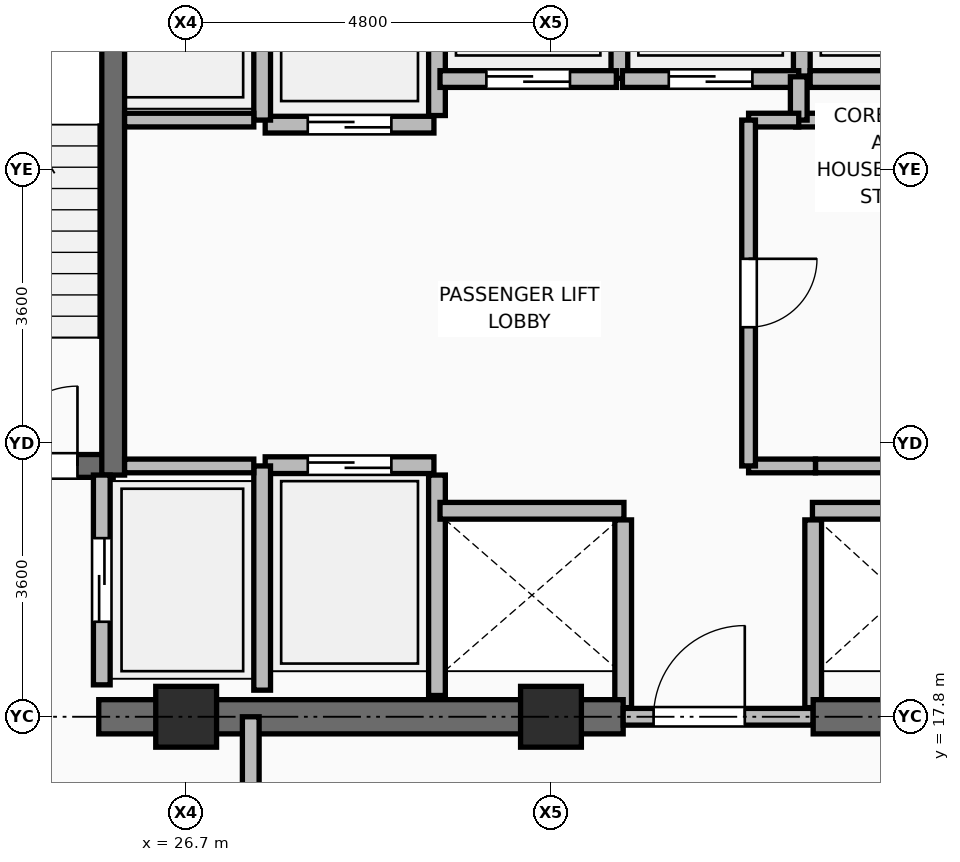
"""IFC4 building model, lengths in metres.
Left out: names, types, materials, properties, quantities, classifications, styles, units other than length and angle.
Written with IfcOpenShell. Run it as: python <this file> out.ifc"""

import sys

from ifc_helpers import new_model, si_unit, direction, frame, frame_2d, origin, origin_2d, place, context, subcontext, project, spatial, rectangle, extrude, element, fill, save


model = new_model("IFC4")
c1 = context("Model", 3, precision=1e-05, world=origin(), true_north=direction((0.0, 1.0)))
c2 = subcontext(c1, "Body", "Model", "MODEL_VIEW")
j1 = project(units=[si_unit("LENGTHUNIT", "METRE"), si_unit("PLANEANGLEUNIT", "RADIAN")], contexts=[c1])
p1 = place(None, origin())
s1 = spatial("IfcSite", under=j1, at=p1, CompositionType="ELEMENT")
p2 = place(p1, origin())
s2 = spatial("IfcBuilding", under=s1, at=p2, CompositionType="ELEMENT")
p3 = place(p2, frame((0.0, 0.0, 249.9)))
s3 = spatial("IfcBuildingStorey", under=s2, at=p3, CompositionType="ELEMENT", Elevation=249.9)
for number, where, z_axis, x_axis in (
    (1, (26.7, 17.8, 0.0), (0.0, 0.0, 1.0), (1.0, 0.0, 0.0)),
    (2, (31.5, 17.8, 0.0), (0.0, 0.0, 1.0), (1.0, 0.0, 0.0)),
):
    element("IfcColumn", number, at=place(p3, frame(where, z_axis=z_axis, x_axis=x_axis)), inside=s3, PredefinedType="COLUMN", context=c2, shape_type="SweptSolid", body=[
        extrude(rectangle(XDim=0.8, YDim=0.8, at=origin_2d()), origin(), (0.0, 0.0, 1.0), 3.75),
    ])
p4 = place(p3, frame((30.0, 18.08, 0.0), z_axis=(0.0, 0.0, 1.0), x_axis=(0.0, 1.0, 0.0)))
e3 = element("IfcWall", 3, at=p4, inside=s3, PredefinedType="PARTITIONING", context=c2, shape_type="SweptSolid", body=[
    extrude(rectangle(XDim=2.9, YDim=0.22, at=frame_2d((1.45, 0.0))), origin(), (0.0, 0.0, 1.0), 3.475),
])
for number, where, z_axis, x_axis in (
    (4, (32.45, 17.92, 0.0), (0.0, 0.0, 1.0), (0.0, 1.0, 0.0)),
    (5, (34.95, 17.92, 0.0), (0.0, 0.0, 1.0), (0.0, 1.0, 0.0)),
):
    element("IfcWall", number, at=place(p3, frame(where, z_axis=z_axis, x_axis=x_axis)), inside=s3, PredefinedType="PARTITIONING", context=c2, shape_type="SweptSolid", body=[
        extrude(rectangle(XDim=2.47, YDim=0.22, at=frame_2d((1.235, 0.0))), origin(), (0.0, 0.0, 1.0), 3.475),
    ])
p5 = place(p3, frame((30.0, 25.71, 0.0), z_axis=(0.0, 0.0, 1.0), x_axis=(0.0, 1.0, 0.0)))
e6 = element("IfcWall", 6, at=p5, inside=s3, PredefinedType="PARTITIONING", context=c2, shape_type="SweptSolid", body=[
    extrude(rectangle(XDim=2.73, YDim=0.22, at=frame_2d((1.365, 0.0))), origin(), (0.0, 0.0, 1.0), 3.475),
])
p6 = place(p3, frame((32.4, 26.2, 0.0), z_axis=(0.0, 0.0, 1.0), x_axis=(0.0, 1.0, 0.0)))
e7 = element("IfcWall", 7, at=p6, inside=s3, PredefinedType="PARTITIONING", context=c2, shape_type="SweptSolid", body=[
    extrude(rectangle(XDim=2.24, YDim=0.22, at=frame_2d((1.12, 0.0))), origin(), (0.0, 0.0, 1.0), 3.475),
])
p7 = place(p3, frame((34.8, 26.23, 0.0), z_axis=(0.0, 0.0, 1.0), x_axis=(0.0, 1.0, 0.0)))
e8 = element("IfcWall", 8, at=p7, inside=s3, PredefinedType="PARTITIONING", context=c2, shape_type="SweptSolid", body=[
    extrude(rectangle(XDim=2.21, YDim=0.22, at=frame_2d((1.105, 0.0))), origin(), (0.0, 0.0, 1.0), 3.475),
])
p8 = place(p3, frame((34.91, 26.19, 0.0), z_axis=(0.0, 0.0, 1.0), x_axis=(1.0, 0.0, 0.0)))
e9 = element("IfcWall", 9, at=p8, inside=s3, PredefinedType="PARTITIONING", context=c2, shape_type="SweptSolid", body=[
    extrude(rectangle(XDim=2.14, YDim=0.22, at=frame_2d((1.07, 0.0))), origin(), (0.0, 0.0, 1.0), 3.475),
])
p9 = place(p3, frame((25.55, 17.8, 0.0), z_axis=(0.0, 0.0, 1.0), x_axis=(1.0, 0.0, 0.0)))
e10 = element("IfcWall", 10, at=p9, inside=s3, PredefinedType="SHEAR", context=c2, shape_type="SweptSolid", body=[
    extrude(rectangle(XDim=6.9, YDim=0.45, at=frame_2d((3.45, 0.0))), origin(), (0.0, 0.0, 1.0), 3.5),
])
p10 = place(p3, frame((32.45, 17.8, 0.0), z_axis=(0.0, 0.0, 1.0), x_axis=(1.0, 0.0, 0.0)))
e11 = element("IfcWall", 11, at=p10, inside=s3, PredefinedType="PARTITIONING", context=c2, shape_type="SweptSolid", body=[
    extrude(rectangle(XDim=2.5, YDim=0.22, at=frame_2d((1.25, 0.0))), origin(), (0.0, 0.0, 1.0), 3.012),
])
p11 = place(p10, frame((0.4, 0.0, 0.0)))
e12 = element("IfcOpeningElement", 12, at=p11, cuts=e11, PredefinedType="OPENING", context=c2, shape_type="SweptSolid", body=[
    extrude(rectangle(XDim=1.2, YDim=2.1, at=frame_2d((0.6, 1.05))), frame((0.0, 0.12, 0.0), z_axis=(0.0, -1.0, 0.0), x_axis=(1.0, 0.0, 0.0)), (0.0, 0.0, 1.0), 0.24),
])
p12 = place(p3, frame((34.95, 17.8, 0.0), z_axis=(0.0, 0.0, 1.0), x_axis=(1.0, 0.0, 0.0)))
e13 = element("IfcWall", 13, at=p12, inside=s3, PredefinedType="SHEAR", context=c2, shape_type="SweptSolid", body=[
    extrude(rectangle(XDim=6.375, YDim=0.45, at=frame_2d((3.188, 0.0))), origin(), (0.0, 0.0, 1.0), 3.5),
])
p13 = place(p3, frame((22.125, 21.1, 0.0), z_axis=(0.0, 0.0, 1.0), x_axis=(1.0, 0.0, 0.0)))
e14 = element("IfcWall", 14, at=p13, inside=s3, PredefinedType="SHEAR", context=c2, shape_type="SweptSolid", body=[
    extrude(rectangle(XDim=3.615, YDim=0.3, at=frame_2d((1.808, 0.0))), origin(), (0.0, 0.0, 1.0), 3.5),
])
p14 = place(p13, frame((2.095, 0.0, 0.0)))
e15 = element("IfcOpeningElement", 15, at=p14, cuts=e14, PredefinedType="OPENING", context=c2, shape_type="SweptSolid", body=[
    extrude(rectangle(XDim=1.05, YDim=2.1, at=frame_2d((0.525, 1.05))), frame((0.0, 0.16, 0.0), z_axis=(0.0, -1.0, 0.0), x_axis=(1.0, 0.0, 0.0)), (0.0, 0.0, 1.0), 0.32),
])
p15 = place(p3, frame((25.74, 20.98, 0.0), z_axis=(0.0, 0.0, 1.0), x_axis=(0.0, 1.0, 0.0)))
e16 = element("IfcWall", 16, at=p15, inside=s3, PredefinedType="SHEAR", context=c2, shape_type="SweptSolid", body=[
    extrude(rectangle(XDim=7.99, YDim=0.3, at=frame_2d((3.995, 0.0))), origin(), (0.0, 0.0, 1.0), 3.5),
])
p16 = place(p3, frame((25.59, 18.22, 0.0), z_axis=(0.0, 0.0, 1.0), x_axis=(0.0, 1.0, 0.0)))
e17 = element("IfcWall", 17, at=p16, inside=s3, PredefinedType="PARTITIONING", context=c2, shape_type="SweptSolid", body=[
    extrude(rectangle(XDim=2.76, YDim=0.22, at=frame_2d((1.38, 0.0))), origin(), (0.0, 0.0, 1.0), 3.48),
])
p17 = place(p16, frame((0.83, 0.0, 0.0)))
e18 = element("IfcOpeningElement", 18, at=p17, cuts=e17, PredefinedType="OPENING", context=c2, shape_type="SweptSolid", body=[
    extrude(rectangle(XDim=1.1, YDim=2.2, at=frame_2d((0.55, 1.1))), frame((0.0, 0.12, 0.0), z_axis=(0.0, -1.0, 0.0), x_axis=(1.0, 0.0, 0.0)), (0.0, 0.0, 1.0), 0.24),
])
p18 = place(p3, frame((27.74, 21.11, 0.0), z_axis=(0.0, 0.0, 1.0), x_axis=(1.0, 0.0, 0.0)))
e19 = element("IfcWall", 19, at=p18, inside=s3, PredefinedType="PARTITIONING", context=c2, shape_type="SweptSolid", body=[
    extrude(rectangle(XDim=2.22, YDim=0.22, at=frame_2d((1.11, 0.0))), origin(), (0.0, 0.0, 1.0), 3.48),
])
p19 = place(p18, frame((0.56, 0.0, 0.0)))
e20 = element("IfcOpeningElement", 20, at=p19, cuts=e19, PredefinedType="OPENING", context=c2, shape_type="SweptSolid", body=[
    extrude(rectangle(XDim=1.1, YDim=2.2, at=frame_2d((0.55, 1.1))), frame((0.0, 0.12, 0.0), z_axis=(0.0, -1.0, 0.0), x_axis=(1.0, 0.0, 0.0)), (0.0, 0.0, 1.0), 0.24),
])
p20 = place(p3, frame((27.74, 25.59, 0.0), z_axis=(0.0, 0.0, 1.0), x_axis=(1.0, 0.0, 0.0)))
e21 = element("IfcWall", 21, at=p20, inside=s3, PredefinedType="PARTITIONING", context=c2, shape_type="SweptSolid", body=[
    extrude(rectangle(XDim=2.22, YDim=0.22, at=frame_2d((1.11, 0.0))), origin(), (0.0, 0.0, 1.0), 3.48),
])
p21 = place(p20, frame((0.56, 0.0, 0.0)))
e22 = element("IfcOpeningElement", 22, at=p21, cuts=e21, PredefinedType="OPENING", context=c2, shape_type="SweptSolid", body=[
    extrude(rectangle(XDim=1.1, YDim=2.2, at=frame_2d((0.55, 1.1))), frame((0.0, 0.12, 0.0), z_axis=(0.0, -1.0, 0.0), x_axis=(1.0, 0.0, 0.0)), (0.0, 0.0, 1.0), 0.24),
])
p22 = place(p3, frame((30.04, 20.51, 0.0), z_axis=(0.0, 0.0, 1.0), x_axis=(1.0, 0.0, 0.0)))
e23 = element("IfcWall", 23, at=p22, inside=s3, PredefinedType="PARTITIONING", context=c2, shape_type="SweptSolid", body=[
    extrude(rectangle(XDim=2.42, YDim=0.22, at=frame_2d((1.21, 0.0))), origin(), (0.0, 0.0, 1.0), 3.48),
])
p23 = place(p3, frame((34.94, 20.51, 0.0), z_axis=(0.0, 0.0, 1.0), x_axis=(1.0, 0.0, 0.0)))
e24 = element("IfcWall", 24, at=p23, inside=s3, PredefinedType="PARTITIONING", context=c2, shape_type="SweptSolid", body=[
    extrude(rectangle(XDim=2.24, YDim=0.22, at=frame_2d((1.12, 0.0))), origin(), (0.0, 0.0, 1.0), 3.48),
])
p24 = place(p3, frame((30.04, 26.19, 0.0), z_axis=(0.0, 0.0, 1.0), x_axis=(1.0, 0.0, 0.0)))
e25 = element("IfcWall", 25, at=p24, inside=s3, PredefinedType="PARTITIONING", context=c2, shape_type="SweptSolid", body=[
    extrude(rectangle(XDim=2.32, YDim=0.22, at=frame_2d((1.16, 0.0))), origin(), (0.0, 0.0, 1.0), 3.48),
])
p25 = place(p24, frame((0.61, 0.0, 0.0)))
e26 = element("IfcOpeningElement", 26, at=p25, cuts=e25, PredefinedType="OPENING", context=c2, shape_type="SweptSolid", body=[
    extrude(rectangle(XDim=1.1, YDim=2.2, at=frame_2d((0.55, 1.1))), frame((0.0, 0.12, 0.0), z_axis=(0.0, -1.0, 0.0), x_axis=(1.0, 0.0, 0.0)), (0.0, 0.0, 1.0), 0.24),
])
p26 = place(p3, frame((32.44, 26.19, 0.0), z_axis=(0.0, 0.0, 1.0), x_axis=(1.0, 0.0, 0.0)))
e27 = element("IfcWall", 27, at=p26, inside=s3, PredefinedType="PARTITIONING", context=c2, shape_type="SweptSolid", body=[
    extrude(rectangle(XDim=2.32, YDim=0.22, at=frame_2d((1.16, 0.0))), origin(), (0.0, 0.0, 1.0), 3.48),
])
p27 = place(p26, frame((0.61, 0.0, 0.0)))
e28 = element("IfcOpeningElement", 28, at=p27, cuts=e27, PredefinedType="OPENING", context=c2, shape_type="SweptSolid", body=[
    extrude(rectangle(XDim=1.1, YDim=2.2, at=frame_2d((0.55, 1.1))), frame((0.0, 0.12, 0.0), z_axis=(0.0, -1.0, 0.0), x_axis=(1.0, 0.0, 0.0)), (0.0, 0.0, 1.0), 0.24),
])
p28 = place(p3, frame((27.7, 18.15, 0.0), z_axis=(0.0, 0.0, 1.0), x_axis=(0.0, 1.0, 0.0)))
e29 = element("IfcWall", 29, at=p28, inside=s3, PredefinedType="PARTITIONING", context=c2, shape_type="SweptSolid", body=[
    extrude(rectangle(XDim=2.95, YDim=0.22, at=frame_2d((1.475, 0.0))), origin(), (0.0, 0.0, 1.0), 3.48),
])
p29 = place(p3, frame((27.7, 25.65, 0.0), z_axis=(0.0, 0.0, 1.0), x_axis=(0.0, 1.0, 0.0)))
e30 = element("IfcWall", 30, at=p29, inside=s3, PredefinedType="PARTITIONING", context=c2, shape_type="SweptSolid", body=[
    extrude(rectangle(XDim=3.0, YDim=0.22, at=frame_2d((1.5, 0.0))), origin(), (0.0, 0.0, 1.0), 3.48),
])
for number, where, z_axis, x_axis in (
    (31, (25.89, 21.1, 0.0), (0.0, 0.0, 1.0), (1.0, 0.0, 0.0)),
    (32, (25.89, 25.65, 0.0), (0.0, 0.0, 1.0), (1.0, 0.0, 0.0)),
):
    element("IfcWall", number, at=place(p3, frame(where, z_axis=z_axis, x_axis=x_axis)), inside=s3, PredefinedType="PARTITIONING", context=c2, shape_type="SweptSolid", body=[
        extrude(rectangle(XDim=1.7, YDim=0.18, at=frame_2d((0.85, 0.0))), origin(), (0.0, 0.0, 1.0), 3.48),
    ])
p30 = place(p3, frame((34.98, 21.1, 0.0), z_axis=(0.0, 0.0, 1.0), x_axis=(1.0, 0.0, 0.0)))
e33 = element("IfcWall", 33, at=p30, inside=s3, PredefinedType="PARTITIONING", context=c2, shape_type="SweptSolid", body=[
    extrude(rectangle(XDim=2.08, YDim=0.18, at=frame_2d((1.04, 0.0))), origin(), (0.0, 0.0, 1.0), 3.48),
])
p31 = place(p3, frame((34.72, 25.65, 0.0), z_axis=(0.0, 0.0, 1.0), x_axis=(1.0, 0.0, 0.0)))
e34 = element("IfcWall", 34, at=p31, inside=s3, PredefinedType="PARTITIONING", context=c2, shape_type="SweptSolid", body=[
    extrude(rectangle(XDim=2.34, YDim=0.18, at=frame_2d((1.17, 0.0))), origin(), (0.0, 0.0, 1.0), 3.48),
])
p32 = place(p3, frame((34.76, 25.65, 0.0), z_axis=(0.0, 0.0, 1.0), x_axis=(0.0, 1.0, 0.0)))
e35 = element("IfcWall", 35, at=p32, inside=s3, PredefinedType="PARTITIONING", context=c2, shape_type="SweptSolid", body=[
    extrude(rectangle(XDim=0.57, YDim=0.22, at=frame_2d((0.285, 0.0))), origin(), (0.0, 0.0, 1.0), 3.48),
])
p33 = place(p3, frame((34.1, 21.1, 0.0), z_axis=(0.0, 0.0, 1.0), x_axis=(1.0, 0.0, 0.0)))
e36 = element("IfcWall", 36, at=p33, inside=s3, PredefinedType="PARTITIONING", context=c2, shape_type="SweptSolid", body=[
    extrude(rectangle(XDim=0.88, YDim=0.18, at=frame_2d((0.44, 0.0))), origin(), (0.0, 0.0, 1.0), 3.48),
])
p34 = place(p3, frame((34.1, 25.65, 0.0), z_axis=(0.0, 0.0, 1.0), x_axis=(1.0, 0.0, 0.0)))
e37 = element("IfcWall", 37, at=p34, inside=s3, PredefinedType="PARTITIONING", context=c2, shape_type="SweptSolid", body=[
    extrude(rectangle(XDim=0.66, YDim=0.18, at=frame_2d((0.33, 0.0))), origin(), (0.0, 0.0, 1.0), 3.48),
])
p35 = place(p3, frame((34.1, 21.1, 0.0), z_axis=(0.0, 0.0, 1.0), x_axis=(0.0, 1.0, 0.0)))
e38 = element("IfcWall", 38, at=p35, inside=s3, PredefinedType="PARTITIONING", context=c2, shape_type="SweptSolid", body=[
    extrude(rectangle(XDim=4.55, YDim=0.18, at=frame_2d((2.275, 0.0))), origin(), (0.0, 0.0, 1.0), 3.48),
])
p36 = place(p35, frame((1.825, 0.0, 0.0)))
e39 = element("IfcOpeningElement", 39, at=p36, cuts=e38, PredefinedType="OPENING", context=c2, shape_type="SweptSolid", body=[
    extrude(rectangle(XDim=0.9, YDim=2.1, at=frame_2d((0.45, 1.05))), frame((0.0, 0.1, 0.0), z_axis=(0.0, -1.0, 0.0), x_axis=(1.0, 0.0, 0.0)), (0.0, 0.0, 1.0), 0.2),
])
p37 = place(p3, frame((27.55, 14.35, 0.0), z_axis=(0.0, 0.0, 1.0), x_axis=(0.0, 1.0, 0.0)))
e40 = element("IfcWall", 40, at=p37, inside=s3, PredefinedType="PARTITIONING", context=c2, shape_type="SweptSolid", body=[
    extrude(rectangle(XDim=3.45, YDim=0.22, at=frame_2d((1.725, 0.0))), origin(), (0.0, 0.0, 1.0), 3.012),
])
p38 = place(p37, frame((1.175, 0.0, 0.0)))
e41 = element("IfcOpeningElement", 41, at=p38, cuts=e40, PredefinedType="OPENING", context=c2, shape_type="SweptSolid", body=[
    extrude(rectangle(XDim=1.1, YDim=2.1, at=frame_2d((0.55, 1.05))), frame((0.0, 0.12, 0.0), z_axis=(0.0, -1.0, 0.0), x_axis=(1.0, 0.0, 0.0)), (0.0, 0.0, 1.0), 0.24),
])
p39 = place(p11, origin())
e42 = element("IfcDoor", 42, at=p39, inside=s3, OperationType="SINGLE_SWING_RIGHT", PredefinedType="DOOR", context=c2, shape_type="SweptSolid", body=[
    extrude(rectangle(XDim=1.2, YDim=2.1, at=frame_2d((0.6, 1.05))), frame((0.0, 0.025, 0.0), z_axis=(0.0, -1.0, 0.0), x_axis=(1.0, 0.0, 0.0)), (0.0, 0.0, 1.0), 0.05),
])
fill(e12, e42)
p40 = place(p14, origin())
e43 = element("IfcDoor", 43, at=p40, inside=s3, OperationType="SINGLE_SWING_RIGHT", PredefinedType="DOOR", context=c2, shape_type="SweptSolid", body=[
    extrude(rectangle(XDim=1.05, YDim=2.1, at=frame_2d((0.525, 1.05))), frame((0.0, 0.025, 0.0), z_axis=(0.0, -1.0, 0.0), x_axis=(1.0, 0.0, 0.0)), (0.0, 0.0, 1.0), 0.05),
])
fill(e15, e43)
p41 = place(p17, origin())
e44 = element("IfcDoor", 44, at=p41, inside=s3, OperationType="DOUBLE_DOOR_SLIDING", PredefinedType="DOOR", context=c2, shape_type="SweptSolid", body=[
    extrude(rectangle(XDim=1.1, YDim=2.2, at=frame_2d((0.55, 1.1))), frame((0.0, 0.025, 0.0), z_axis=(0.0, -1.0, 0.0), x_axis=(1.0, 0.0, 0.0)), (0.0, 0.0, 1.0), 0.05),
])
fill(e18, e44)
p42 = place(p19, origin())
e45 = element("IfcDoor", 45, at=p42, inside=s3, OperationType="DOUBLE_DOOR_SLIDING", PredefinedType="DOOR", context=c2, shape_type="SweptSolid", body=[
    extrude(rectangle(XDim=1.1, YDim=2.2, at=frame_2d((0.55, 1.1))), frame((0.0, 0.025, 0.0), z_axis=(0.0, -1.0, 0.0), x_axis=(1.0, 0.0, 0.0)), (0.0, 0.0, 1.0), 0.05),
])
fill(e20, e45)
p43 = place(p21, frame((1.1, 0.0, 0.0), z_axis=(0.0, 0.0, 1.0), x_axis=(-1.0, 0.0, 0.0)))
e46 = element("IfcDoor", 46, at=p43, inside=s3, OperationType="DOUBLE_DOOR_SLIDING", PredefinedType="DOOR", context=c2, shape_type="SweptSolid", body=[
    extrude(rectangle(XDim=1.1, YDim=2.2, at=frame_2d((0.55, 1.1))), frame((0.0, 0.025, 0.0), z_axis=(0.0, -1.0, 0.0), x_axis=(1.0, 0.0, 0.0)), (0.0, 0.0, 1.0), 0.05),
])
fill(e22, e46)
p44 = place(p25, frame((1.1, 0.0, 0.0), z_axis=(0.0, 0.0, 1.0), x_axis=(-1.0, 0.0, 0.0)))
e47 = element("IfcDoor", 47, at=p44, inside=s3, OperationType="DOUBLE_DOOR_SLIDING", PredefinedType="DOOR", context=c2, shape_type="SweptSolid", body=[
    extrude(rectangle(XDim=1.1, YDim=2.2, at=frame_2d((0.55, 1.1))), frame((0.0, 0.025, 0.0), z_axis=(0.0, -1.0, 0.0), x_axis=(1.0, 0.0, 0.0)), (0.0, 0.0, 1.0), 0.05),
])
fill(e26, e47)
p45 = place(p27, frame((1.1, 0.0, 0.0), z_axis=(0.0, 0.0, 1.0), x_axis=(-1.0, 0.0, 0.0)))
e48 = element("IfcDoor", 48, at=p45, inside=s3, OperationType="DOUBLE_DOOR_SLIDING", PredefinedType="DOOR", context=c2, shape_type="SweptSolid", body=[
    extrude(rectangle(XDim=1.1, YDim=2.2, at=frame_2d((0.55, 1.1))), frame((0.0, 0.025, 0.0), z_axis=(0.0, -1.0, 0.0), x_axis=(1.0, 0.0, 0.0)), (0.0, 0.0, 1.0), 0.05),
])
fill(e28, e48)
p46 = place(p36, frame((0.9, 0.0, 0.0), z_axis=(0.0, 0.0, 1.0), x_axis=(-1.0, 0.0, 0.0)))
e49 = element("IfcDoor", 49, at=p46, inside=s3, OperationType="SINGLE_SWING_LEFT", PredefinedType="DOOR", context=c2, shape_type="SweptSolid", body=[
    extrude(rectangle(XDim=0.9, YDim=2.1, at=frame_2d((0.45, 1.05))), frame((0.0, 0.025, 0.0), z_axis=(0.0, -1.0, 0.0), x_axis=(1.0, 0.0, 0.0)), (0.0, 0.0, 1.0), 0.05),
])
fill(e39, e49)
save(model, sys.argv[1])
